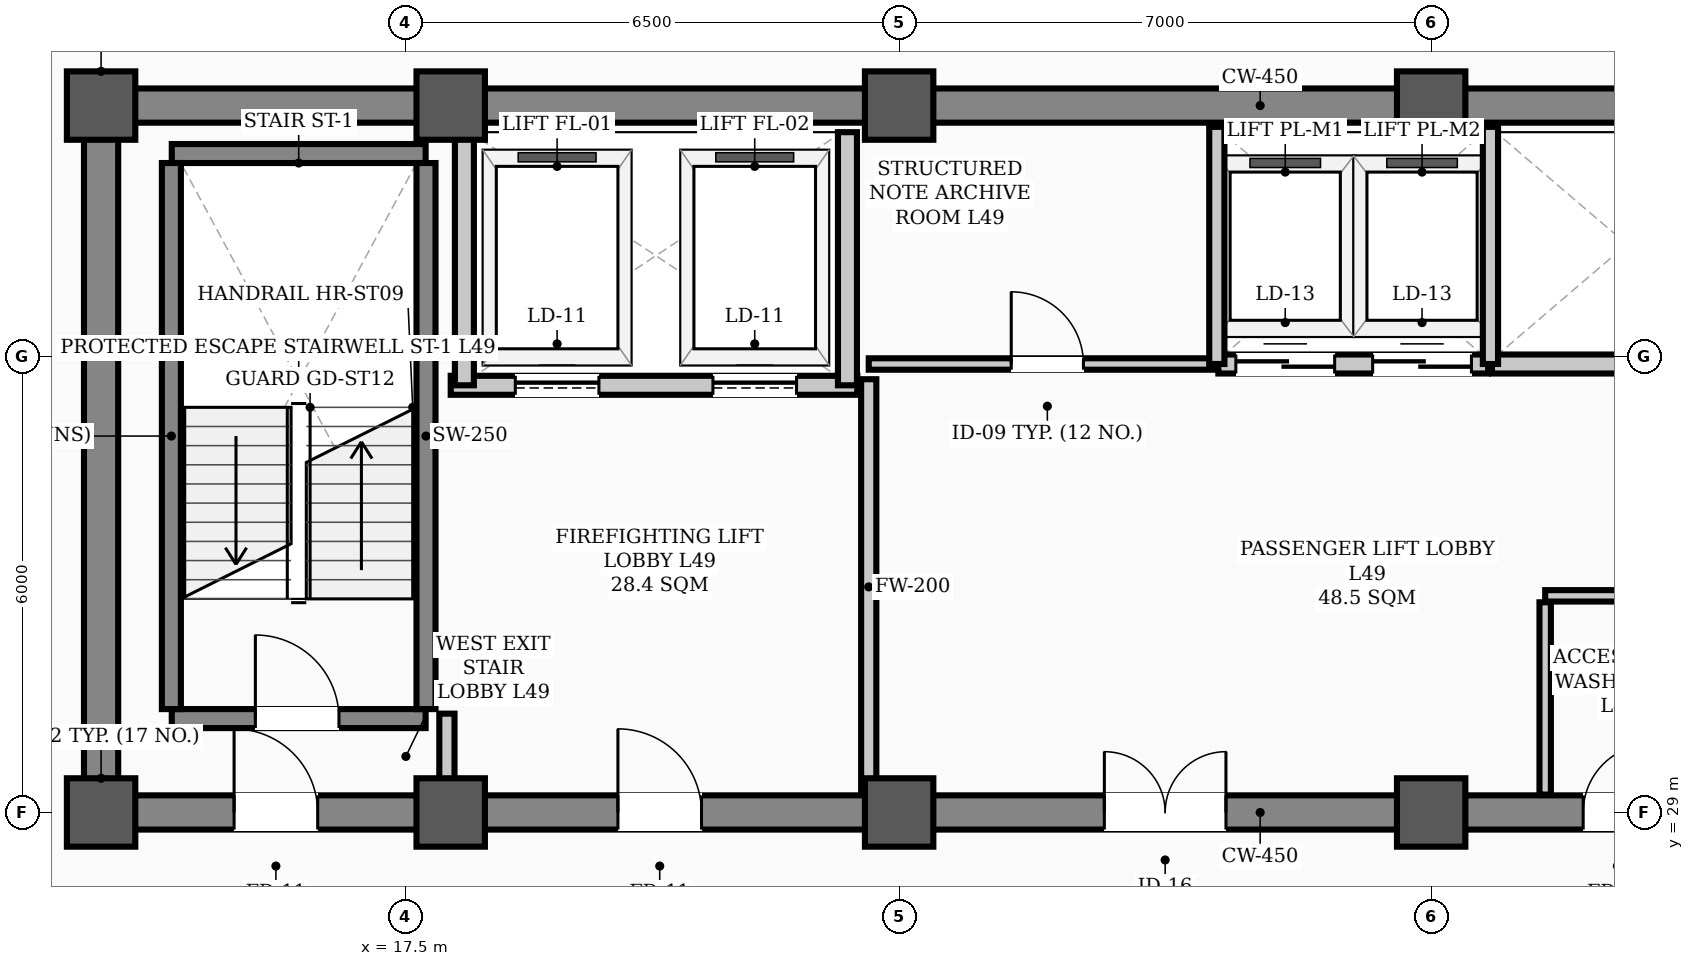
"""IFC4 building model, lengths in metres.
Left out: names, types, materials, properties, quantities, classifications, styles, units other than length and angle.
Written with IfcOpenShell. Run it as: python <this file> out.ifc"""

import sys

from ifc_helpers import new_model, si_unit, direction, frame, frame_2d, origin, origin_2d, place, context, subcontext, project, spatial, rectangle, hollow_rectangle, extrude, element, fill, save


model = new_model("IFC4")
c1 = context("Model", 3, precision=1e-05, world=origin(), true_north=direction((0.0, 1.0)))
c2 = subcontext(c1, "Body", "Model", "MODEL_VIEW")
j1 = project(units=[si_unit("LENGTHUNIT", "METRE"), si_unit("PLANEANGLEUNIT", "RADIAN")], contexts=[c1])
p1 = place(None, origin())
s1 = spatial("IfcSite", under=j1, at=p1, CompositionType="ELEMENT")
p2 = place(p1, origin())
s2 = spatial("IfcBuilding", under=s1, at=p2, CompositionType="ELEMENT")
p3 = place(p2, frame((0.0, 0.0, 196.8)))
s3 = spatial("IfcBuildingStorey", under=s2, at=p3, CompositionType="ELEMENT", Elevation=196.8)
for number, where, z_axis, x_axis in (
    (1, (13.5, 29.0, 0.0), (0.0, 0.0, 1.0), (1.0, 0.0, 0.0)),
    (2, (13.5, 38.3, 0.0), (0.0, 0.0, 1.0), (1.0, 0.0, 0.0)),
    (3, (18.1, 29.0, 0.0), (0.0, 0.0, 1.0), (1.0, 0.0, 0.0)),
    (4, (18.1, 38.3, 0.0), (0.0, 0.0, 1.0), (1.0, 0.0, 0.0)),
    (5, (24.0, 29.0, 0.0), (0.0, 0.0, 1.0), (1.0, 0.0, 0.0)),
    (6, (24.0, 38.3, 0.0), (0.0, 0.0, 1.0), (1.0, 0.0, 0.0)),
    (7, (31.0, 29.0, 0.0), (0.0, 0.0, 1.0), (1.0, 0.0, 0.0)),
    (8, (31.0, 38.3, 0.0), (0.0, 0.0, 1.0), (1.0, 0.0, 0.0)),
):
    element("IfcColumn", number, at=place(p3, frame(where, z_axis=z_axis, x_axis=x_axis)), inside=s3, PredefinedType="COLUMN", context=c2, shape_type="SweptSolid", body=[
        extrude(hollow_rectangle(XDim=0.9, YDim=0.9, WallThickness=0.035, InnerFilletRadius=0.017, OuterFilletRadius=0.052, at=origin_2d()), origin(), (0.0, 0.0, 1.0), 3.9),
    ])
p4 = place(p3, frame((13.5, 29.0, 0.0), z_axis=(0.0, 0.0, 1.0), x_axis=(1.0, 0.0, 0.0)))
e9 = element("IfcWall", 9, at=p4, inside=s3, PredefinedType="SHEAR", context=c2, shape_type="SweptSolid", body=[
    extrude(rectangle(XDim=30.5, YDim=0.45, at=frame_2d((15.25, 0.0))), origin(), (0.0, 0.0, 1.0), 3.6),
])
p5 = place(p4, frame((1.75, 0.0, 0.0)))
e10 = element("IfcOpeningElement", 10, at=p5, cuts=e9, PredefinedType="OPENING", context=c2, shape_type="SweptSolid", body=[
    extrude(rectangle(XDim=1.1, YDim=2.08, at=frame_2d((0.55, 1.04))), frame((0.0, 0.235, 0.0), z_axis=(0.0, -1.0, 0.0), x_axis=(1.0, 0.0, 0.0)), (0.0, 0.0, 1.0), 0.47),
])
p6 = place(p4, frame((26.7, 0.0, 0.0)))
e11 = element("IfcOpeningElement", 11, at=p6, cuts=e9, PredefinedType="OPENING", context=c2, shape_type="SweptSolid", body=[
    extrude(rectangle(XDim=1.1, YDim=2.08, at=frame_2d((0.55, 1.04))), frame((0.0, 0.235, 0.0), z_axis=(0.0, -1.0, 0.0), x_axis=(1.0, 0.0, 0.0)), (0.0, 0.0, 1.0), 0.47),
])
p7 = place(p4, frame((6.8, 0.0, 0.0)))
e12 = element("IfcOpeningElement", 12, at=p7, cuts=e9, PredefinedType="OPENING", context=c2, shape_type="SweptSolid", body=[
    extrude(rectangle(XDim=1.1, YDim=2.08, at=frame_2d((0.55, 1.04))), frame((0.0, 0.235, 0.0), z_axis=(0.0, -1.0, 0.0), x_axis=(1.0, 0.0, 0.0)), (0.0, 0.0, 1.0), 0.47),
])
p8 = place(p4, frame((13.2, 0.0, 0.0)))
e13 = element("IfcOpeningElement", 13, at=p8, cuts=e9, PredefinedType="OPENING", context=c2, shape_type="SweptSolid", body=[
    extrude(rectangle(XDim=1.6, YDim=2.08, at=frame_2d((0.8, 1.04))), frame((0.0, 0.235, 0.0), z_axis=(0.0, -1.0, 0.0), x_axis=(1.0, 0.0, 0.0)), (0.0, 0.0, 1.0), 0.47),
])
p9 = place(p4, frame((19.5, 0.0, 0.0)))
e14 = element("IfcOpeningElement", 14, at=p9, cuts=e9, PredefinedType="OPENING", context=c2, shape_type="SweptSolid", body=[
    extrude(rectangle(XDim=0.9, YDim=2.08, at=frame_2d((0.45, 1.04))), frame((0.0, 0.235, 0.0), z_axis=(0.0, -1.0, 0.0), x_axis=(1.0, 0.0, 0.0)), (0.0, 0.0, 1.0), 0.47),
])
p10 = place(p4, frame((21.55, 0.0, 0.0)))
e15 = element("IfcOpeningElement", 15, at=p10, cuts=e9, PredefinedType="OPENING", context=c2, shape_type="SweptSolid", body=[
    extrude(rectangle(XDim=0.9, YDim=2.08, at=frame_2d((0.45, 1.04))), frame((0.0, 0.235, 0.0), z_axis=(0.0, -1.0, 0.0), x_axis=(1.0, 0.0, 0.0)), (0.0, 0.0, 1.0), 0.47),
])
p11 = place(p3, frame((13.5, 38.3, 0.0), z_axis=(0.0, 0.0, 1.0), x_axis=(1.0, 0.0, 0.0)))
e16 = element("IfcWall", 16, at=p11, inside=s3, PredefinedType="SHEAR", context=c2, shape_type="SweptSolid", body=[
    extrude(rectangle(XDim=30.5, YDim=0.45, at=frame_2d((15.25, 0.0))), origin(), (0.0, 0.0, 1.0), 3.6),
])
p12 = place(p3, frame((13.5, 29.35, 0.0), z_axis=(0.0, 0.0, 1.0), x_axis=(0.0, 1.0, 0.0)))
e17 = element("IfcWall", 17, at=p12, inside=s3, PredefinedType="SHEAR", context=c2, shape_type="SweptSolid", body=[
    extrude(rectangle(XDim=8.6, YDim=0.45, at=frame_2d((4.3, 0.0))), origin(), (0.0, 0.0, 1.0), 3.6),
])
p13 = place(p3, frame((14.43, 30.235, 0.0), z_axis=(0.0, 0.0, 1.0), x_axis=(1.0, 0.0, 0.0)))
e18 = element("IfcWall", 18, at=p13, inside=s3, PredefinedType="STANDARD", context=c2, shape_type="SweptSolid", body=[
    extrude(rectangle(XDim=3.34, YDim=0.25, at=frame_2d((1.67, 0.0))), origin(), (0.0, 0.0, 1.0), 3.6),
])
p14 = place(p13, frame((1.1, 0.0, 0.0)))
e19 = element("IfcOpeningElement", 19, at=p14, cuts=e18, PredefinedType="OPENING", context=c2, shape_type="SweptSolid", body=[
    extrude(rectangle(XDim=1.1, YDim=2.08, at=frame_2d((0.55, 1.04))), frame((0.0, 0.135, 0.0), z_axis=(0.0, -1.0, 0.0), x_axis=(1.0, 0.0, 0.0)), (0.0, 0.0, 1.0), 0.27),
])
p15 = place(p3, frame((14.43, 37.669, 0.0), z_axis=(0.0, 0.0, 1.0), x_axis=(1.0, 0.0, 0.0)))
e20 = element("IfcWall", 20, at=p15, inside=s3, PredefinedType="STANDARD", context=c2, shape_type="SweptSolid", body=[
    extrude(rectangle(XDim=3.34, YDim=0.25, at=frame_2d((1.67, 0.0))), origin(), (0.0, 0.0, 1.0), 3.6),
])
for number, where, z_axis, x_axis in (
    (21, (14.425, 30.36, 0.0), (0.0, 0.0, 1.0), (0.0, 1.0, 0.0)),
    (22, (17.775, 30.36, 0.0), (0.0, 0.0, 1.0), (0.0, 1.0, 0.0)),
):
    element("IfcWall", number, at=place(p3, frame(where, z_axis=z_axis, x_axis=x_axis)), inside=s3, PredefinedType="STANDARD", context=c2, shape_type="SweptSolid", body=[
        extrude(rectangle(XDim=7.184, YDim=0.25, at=frame_2d((3.592, 0.0))), origin(), (0.0, 0.0, 1.0), 3.6),
    ])
p16 = place(p3, frame((18.1, 34.62, 0.0), z_axis=(0.0, 0.0, 1.0), x_axis=(1.0, 0.0, 0.0)))
e23 = element("IfcWall", 23, at=p16, inside=s3, PredefinedType="STANDARD", context=c2, shape_type="SweptSolid", body=[
    extrude(rectangle(XDim=5.35, YDim=0.25, at=frame_2d((2.675, 0.0))), origin(), (0.0, 0.0, 1.0), 3.6),
])
p17 = place(p16, frame((0.85, 0.0, 0.0)))
e24 = element("IfcOpeningElement", 24, at=p17, cuts=e23, PredefinedType="OPENING", context=c2, shape_type="SweptSolid", body=[
    extrude(rectangle(XDim=1.1, YDim=2.08, at=frame_2d((0.55, 1.04))), frame((0.0, 0.135, 0.0), z_axis=(0.0, -1.0, 0.0), x_axis=(1.0, 0.0, 0.0)), (0.0, 0.0, 1.0), 0.27),
])
p18 = place(p16, frame((3.45, 0.0, 0.0)))
e25 = element("IfcOpeningElement", 25, at=p18, cuts=e23, PredefinedType="OPENING", context=c2, shape_type="SweptSolid", body=[
    extrude(rectangle(XDim=1.1, YDim=2.08, at=frame_2d((0.55, 1.04))), frame((0.0, 0.135, 0.0), z_axis=(0.0, -1.0, 0.0), x_axis=(1.0, 0.0, 0.0)), (0.0, 0.0, 1.0), 0.27),
])
for number, where, z_axis, x_axis in (
    (26, (18.28, 34.62, 0.0), (0.0, 0.0, 1.0), (0.0, 1.0, 0.0)),
    (27, (23.32, 34.62, 0.0), (0.0, 0.0, 1.0), (0.0, 1.0, 0.0)),
):
    element("IfcWall", number, at=place(p3, frame(where, z_axis=z_axis, x_axis=x_axis)), inside=s3, PredefinedType="STANDARD", context=c2, shape_type="SweptSolid", body=[
        extrude(rectangle(XDim=3.33, YDim=0.25, at=frame_2d((1.665, 0.0))), origin(), (0.0, 0.0, 1.0), 2.18),
    ])
p19 = place(p3, frame((28.2, 34.9, 0.0), z_axis=(0.0, 0.0, 1.0), x_axis=(1.0, 0.0, 0.0)))
e28 = element("IfcWall", 28, at=p19, inside=s3, PredefinedType="STANDARD", context=c2, shape_type="SweptSolid", body=[
    extrude(rectangle(XDim=3.55, YDim=0.25, at=frame_2d((1.775, 0.0))), origin(), (0.0, 0.0, 1.0), 3.6),
])
p20 = place(p19, frame((0.23, 0.0, 0.0)))
e29 = element("IfcOpeningElement", 29, at=p20, cuts=e28, PredefinedType="OPENING", context=c2, shape_type="SweptSolid", body=[
    extrude(rectangle(XDim=1.3, YDim=2.08, at=frame_2d((0.65, 1.04))), frame((0.0, 0.135, 0.0), z_axis=(0.0, -1.0, 0.0), x_axis=(1.0, 0.0, 0.0)), (0.0, 0.0, 1.0), 0.27),
])
p21 = place(p19, frame((2.03, 0.0, 0.0)))
e30 = element("IfcOpeningElement", 30, at=p21, cuts=e28, PredefinedType="OPENING", context=c2, shape_type="SweptSolid", body=[
    extrude(rectangle(XDim=1.3, YDim=2.08, at=frame_2d((0.65, 1.04))), frame((0.0, 0.135, 0.0), z_axis=(0.0, -1.0, 0.0), x_axis=(1.0, 0.0, 0.0)), (0.0, 0.0, 1.0), 0.27),
])
p22 = place(p3, frame((31.8, 34.9, 0.0), z_axis=(0.0, 0.0, 1.0), x_axis=(1.0, 0.0, 0.0)))
e31 = element("IfcWall", 31, at=p22, inside=s3, PredefinedType="STANDARD", context=c2, shape_type="SweptSolid", body=[
    extrude(rectangle(XDim=3.6, YDim=0.25, at=frame_2d((1.8, 0.0))), origin(), (0.0, 0.0, 1.0), 3.6),
])
p23 = place(p3, frame((23.6, 34.9, 0.0), z_axis=(0.0, 0.0, 1.0), x_axis=(1.0, 0.0, 0.0)))
e32 = element("IfcWall", 32, at=p23, inside=s3, PredefinedType="PARTITIONING", context=c2, shape_type="SweptSolid", body=[
    extrude(rectangle(XDim=4.58, YDim=0.15, at=frame_2d((2.29, 0.0))), origin(), (0.0, 0.0, 1.0), 3.6),
])
p24 = place(p23, frame((1.875, 0.0, 0.0)))
e33 = element("IfcOpeningElement", 33, at=p24, cuts=e32, PredefinedType="OPENING", context=c2, shape_type="SweptSolid", body=[
    extrude(rectangle(XDim=0.95, YDim=2.08, at=frame_2d((0.475, 1.04))), frame((0.0, 0.085, 0.0), z_axis=(0.0, -1.0, 0.0), x_axis=(1.0, 0.0, 0.0)), (0.0, 0.0, 1.0), 0.17),
])
p25 = place(p3, frame((32.5, 31.85, 0.0), z_axis=(0.0, 0.0, 1.0), x_axis=(1.0, 0.0, 0.0)))
e34 = element("IfcWall", 34, at=p25, inside=s3, PredefinedType="PARTITIONING", context=c2, shape_type="SweptSolid", body=[
    extrude(rectangle(XDim=4.1, YDim=0.15, at=frame_2d((2.05, 0.0))), origin(), (0.0, 0.0, 1.0), 3.6),
])
p26 = place(p3, frame((18.05, 29.235, 0.0), z_axis=(0.0, 0.0, 1.0), x_axis=(0.0, 1.0, 0.0)))
e35 = element("IfcWall", 35, at=p26, inside=s3, PredefinedType="STANDARD", context=c2, shape_type="SweptSolid", body=[
    extrude(rectangle(XDim=1.065, YDim=0.2, at=frame_2d((0.532, 0.0))), origin(), (0.0, 0.0, 1.0), 2.18),
])
p27 = place(p3, frame((23.6, 29.235, 0.0), z_axis=(0.0, 0.0, 1.0), x_axis=(0.0, 1.0, 0.0)))
e36 = element("IfcWall", 36, at=p27, inside=s3, PredefinedType="STANDARD", context=c2, shape_type="SweptSolid", body=[
    extrude(rectangle(XDim=5.465, YDim=0.2, at=frame_2d((2.732, 0.0))), origin(), (0.0, 0.0, 1.0), 2.18),
])
p28 = place(p3, frame((32.5, 29.235, 0.0), z_axis=(0.0, 0.0, 1.0), x_axis=(0.0, 1.0, 0.0)))
e37 = element("IfcWall", 37, at=p28, inside=s3, PredefinedType="PARTITIONING", context=c2, shape_type="SweptSolid", body=[
    extrude(rectangle(XDim=2.53, YDim=0.15, at=frame_2d((1.265, 0.0))), origin(), (0.0, 0.0, 1.0), 2.18),
])
for number, where, z_axis, x_axis in (
    (38, (28.18, 34.9, 0.0), (0.0, 0.0, 1.0), (0.0, 1.0, 0.0)),
    (39, (31.78, 34.9, 0.0), (0.0, 0.0, 1.0), (0.0, 1.0, 0.0)),
):
    element("IfcWall", number, at=place(p3, frame(where, z_axis=z_axis, x_axis=x_axis)), inside=s3, PredefinedType="STANDARD", context=c2, shape_type="SweptSolid", body=[
        extrude(rectangle(XDim=3.12, YDim=0.2, at=frame_2d((1.56, 0.0))), origin(), (0.0, 0.0, 1.0), 2.18),
    ])
p29 = place(p14, origin())
e40 = element("IfcDoor", 40, at=p29, inside=s3, OperationType="SINGLE_SWING_LEFT", PredefinedType="DOOR", context=c2, shape_type="SweptSolid", body=[
    extrude(rectangle(XDim=1.1, YDim=2.08, at=frame_2d((0.55, 1.04))), frame((0.0, 0.025, 0.0), z_axis=(0.0, -1.0, 0.0), x_axis=(1.0, 0.0, 0.0)), (0.0, 0.0, 1.0), 0.05),
])
fill(e19, e40)
p30 = place(p5, origin())
e41 = element("IfcDoor", 41, at=p30, inside=s3, OperationType="SINGLE_SWING_LEFT", PredefinedType="DOOR", context=c2, shape_type="SweptSolid", body=[
    extrude(rectangle(XDim=1.1, YDim=2.08, at=frame_2d((0.55, 1.04))), frame((0.0, 0.025, 0.0), z_axis=(0.0, -1.0, 0.0), x_axis=(1.0, 0.0, 0.0)), (0.0, 0.0, 1.0), 0.05),
])
fill(e10, e41)
p31 = place(p7, origin())
e42 = element("IfcDoor", 42, at=p31, inside=s3, OperationType="SINGLE_SWING_LEFT", PredefinedType="DOOR", context=c2, shape_type="SweptSolid", body=[
    extrude(rectangle(XDim=1.1, YDim=2.08, at=frame_2d((0.55, 1.04))), frame((0.0, 0.025, 0.0), z_axis=(0.0, -1.0, 0.0), x_axis=(1.0, 0.0, 0.0)), (0.0, 0.0, 1.0), 0.05),
])
fill(e12, e42)
p32 = place(p8, origin())
e43 = element("IfcDoor", 43, at=p32, inside=s3, OperationType="DOUBLE_DOOR_SINGLE_SWING", PredefinedType="DOOR", context=c2, shape_type="SweptSolid", body=[
    extrude(rectangle(XDim=1.6, YDim=2.08, at=frame_2d((0.8, 1.04))), frame((0.0, 0.025, 0.0), z_axis=(0.0, -1.0, 0.0), x_axis=(1.0, 0.0, 0.0)), (0.0, 0.0, 1.0), 0.05),
])
fill(e13, e43)
p33 = place(p24, origin())
e44 = element("IfcDoor", 44, at=p33, inside=s3, OperationType="SINGLE_SWING_LEFT", PredefinedType="DOOR", context=c2, shape_type="SweptSolid", body=[
    extrude(rectangle(XDim=0.95, YDim=2.08, at=frame_2d((0.475, 1.04))), frame((0.0, 0.025, 0.0), z_axis=(0.0, -1.0, 0.0), x_axis=(1.0, 0.0, 0.0)), (0.0, 0.0, 1.0), 0.05),
])
fill(e33, e44)
p34 = place(p9, origin())
e45 = element("IfcDoor", 45, at=p34, inside=s3, OperationType="SINGLE_SWING_RIGHT", PredefinedType="DOOR", context=c2, shape_type="SweptSolid", body=[
    extrude(rectangle(XDim=0.9, YDim=2.08, at=frame_2d((0.45, 1.04))), frame((0.0, 0.025, 0.0), z_axis=(0.0, -1.0, 0.0), x_axis=(1.0, 0.0, 0.0)), (0.0, 0.0, 1.0), 0.05),
])
fill(e14, e45)
p35 = place(p17, origin())
e46 = element("IfcDoor", 46, at=p35, inside=s3, OperationType="SLIDING_TO_LEFT", PredefinedType="DOOR", context=c2, shape_type="SweptSolid", body=[
    extrude(rectangle(XDim=1.1, YDim=2.08, at=frame_2d((0.55, 1.04))), frame((0.0, 0.025, 0.0), z_axis=(0.0, -1.0, 0.0), x_axis=(1.0, 0.0, 0.0)), (0.0, 0.0, 1.0), 0.05),
])
fill(e24, e46)
p36 = place(p18, origin())
e47 = element("IfcDoor", 47, at=p36, inside=s3, OperationType="SLIDING_TO_LEFT", PredefinedType="DOOR", context=c2, shape_type="SweptSolid", body=[
    extrude(rectangle(XDim=1.1, YDim=2.08, at=frame_2d((0.55, 1.04))), frame((0.0, 0.025, 0.0), z_axis=(0.0, -1.0, 0.0), x_axis=(1.0, 0.0, 0.0)), (0.0, 0.0, 1.0), 0.05),
])
fill(e25, e47)
p37 = place(p20, origin())
e48 = element("IfcDoor", 48, at=p37, inside=s3, OperationType="DOUBLE_DOOR_SLIDING", PredefinedType="DOOR", context=c2, shape_type="SweptSolid", body=[
    extrude(rectangle(XDim=1.3, YDim=2.08, at=frame_2d((0.65, 1.04))), frame((0.0, 0.025, 0.0), z_axis=(0.0, -1.0, 0.0), x_axis=(1.0, 0.0, 0.0)), (0.0, 0.0, 1.0), 0.05),
])
fill(e29, e48)
p38 = place(p21, origin())
e49 = element("IfcDoor", 49, at=p38, inside=s3, OperationType="DOUBLE_DOOR_SLIDING", PredefinedType="DOOR", context=c2, shape_type="SweptSolid", body=[
    extrude(rectangle(XDim=1.3, YDim=2.08, at=frame_2d((0.65, 1.04))), frame((0.0, 0.025, 0.0), z_axis=(0.0, -1.0, 0.0), x_axis=(1.0, 0.0, 0.0)), (0.0, 0.0, 1.0), 0.05),
])
fill(e30, e49)
save(model, sys.argv[1])
